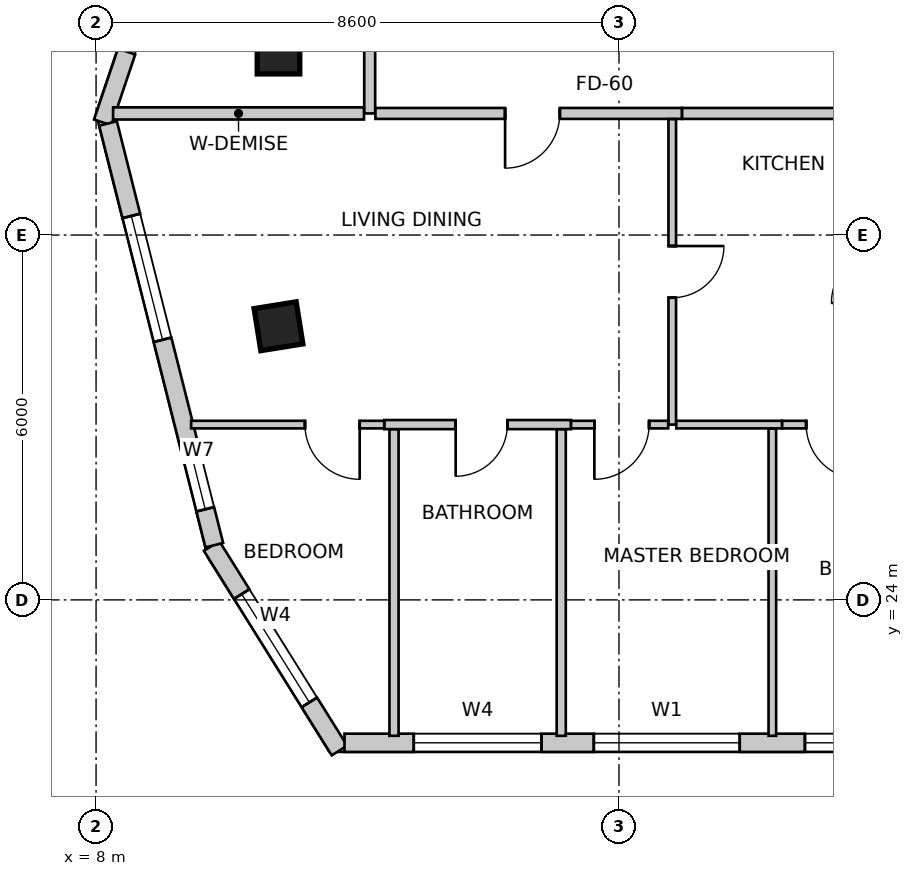
"""IFC4 building model, lengths in metres.
Left out: names, types, materials, properties, quantities, classifications, styles, units other than length and angle.
Written with IfcOpenShell. Run it as: python <this file> out.ifc"""

import sys

from ifc_helpers import new_model, si_unit, direction, frame, frame_2d, origin, origin_2d, place, context, subcontext, project, spatial, rectangle, extrude, source, transform, mapped, element, fill, save


model = new_model("IFC4")
c1 = context("Model", 3, precision=1e-05, world=origin(), true_north=direction((0.0, 1.0)))
c2 = subcontext(c1, "Body", "Model", "MODEL_VIEW")
j1 = project(units=[si_unit("LENGTHUNIT", "METRE"), si_unit("PLANEANGLEUNIT", "RADIAN")], contexts=[c1])
p1 = place(None, origin())
s1 = spatial("IfcSite", under=j1, at=p1, CompositionType="ELEMENT")
p2 = place(p1, origin())
s2 = spatial("IfcBuilding", under=s1, at=p2, CompositionType="ELEMENT")
p3 = place(p2, frame((0.0, 0.0, 288.9)))
s3 = spatial("IfcBuildingStorey", under=s2, at=p3, CompositionType="ELEMENT", Elevation=288.9)
m1 = source(origin(), c2, "Body", "SweptSolid", [
    extrude(rectangle(XDim=0.7, YDim=0.7, at=origin_2d()), origin(), (0.0, 0.0, 1.0), 3.6),
])
for number, where, z_axis, x_axis in (
    (1, (11.0, 33.0, 0.0), (0.0, 0.0, 1.0), (1.0, 0.0, 0.0)),
    (2, (11.0, 28.5, 0.0), (0.0, 0.0, 1.0), (0.158, -0.987, 0.0)),
):
    element("IfcColumn", number, at=place(p3, frame(where, z_axis=z_axis, x_axis=x_axis)), inside=s3, PredefinedType="COLUMN", context=c2, shape_type="MappedRepresentation", body=[
        mapped(m1, transform((0.0, 0.0, 0.0), scale=1.0)),
    ])
p4 = place(p3, frame((9.9, 24.887, 0.0), z_axis=(0.0, 0.0, 1.0), x_axis=(0.530004471907, -0.84799484654, 0.0)))
e3 = element("IfcWall", 3, at=p4, inside=s3, PredefinedType="SOLIDWALL", context=c2, shape_type="SweptSolid", body=[
    extrude(rectangle(XDim=3.967, YDim=0.3, at=frame_2d((1.983, 0.0))), origin(), (0.0, 0.0, 1.0), 3.35),
])
m2 = source(origin(), c2, "Body", "SweptSolid", [
    extrude(rectangle(XDim=2.1, YDim=2.0, at=frame_2d((1.05, 1.0))), frame((0.0, 0.16, 0.0), z_axis=(0.0, -1.0, 0.0), x_axis=(1.0, 0.0, 0.0)), (0.0, 0.0, 1.0), 0.32),
])
p5 = place(p4, frame((0.933, 0.0, 0.85)))
e4 = element("IfcOpeningElement", 4, at=p5, cuts=e3, PredefinedType="OPENING", context=c2, shape_type="MappedRepresentation", body=[
    mapped(m2, transform((0.0, 0.0, 0.0), scale=1.0)),
])
p6 = place(p3, frame((12.086, 21.65, 0.0), z_axis=(0.0, 0.0, 1.0), x_axis=(1.0, 0.0, 0.0)))
e5 = element("IfcWall", 5, at=p6, inside=s3, PredefinedType="SOLIDWALL", context=c2, shape_type="SweptSolid", body=[
    extrude(rectangle(XDim=10.642, YDim=0.3, at=frame_2d((5.321, 0.0))), origin(), (0.0, 0.0, 1.0), 3.35),
])
p7 = place(p6, frame((1.139, 0.0, 0.85)))
e6 = element("IfcOpeningElement", 6, at=p7, cuts=e5, PredefinedType="OPENING", context=c2, shape_type="MappedRepresentation", body=[
    mapped(m2, transform((0.0, 0.0, 0.0), scale=1.0)),
])
m3 = source(origin(), c2, "Body", "SweptSolid", [
    extrude(rectangle(XDim=2.4, YDim=2.2, at=frame_2d((1.2, 1.1))), frame((0.0, 0.16, 0.0), z_axis=(0.0, -1.0, 0.0), x_axis=(1.0, 0.0, 0.0)), (0.0, 0.0, 1.0), 0.32),
])
p8 = place(p6, frame((4.1, 0.0, 0.85)))
e7 = element("IfcOpeningElement", 7, at=p8, cuts=e5, PredefinedType="OPENING", context=c2, shape_type="MappedRepresentation", body=[
    mapped(m3, transform((0.0, 0.0, 0.0), scale=1.0)),
])
p9 = place(p6, frame((7.572, 0.0, 0.85)))
e8 = element("IfcOpeningElement", 8, at=p9, cuts=e5, PredefinedType="OPENING", context=c2, shape_type="MappedRepresentation", body=[
    mapped(m3, transform((0.0, 0.0, 0.0), scale=1.0)),
])
p10 = place(p3, frame((8.502, 33.017, 0.0), z_axis=(0.0, 0.0, 1.0), x_axis=(-0.319798692732, -0.947485512357, 0.0)))
e9 = element("IfcWall", 9, at=p10, inside=s3, PredefinedType="SOLIDWALL", context=c2, shape_type="SweptSolid", body=[
    extrude(rectangle(XDim=1.23, YDim=0.3, at=frame_2d((0.615, 0.0))), origin(), (0.0, 0.0, 1.0), 3.35),
])
p11 = place(p3, frame((8.196, 31.835, 0.0), z_axis=(0.0, 0.0, 1.0), x_axis=(0.244430846523, -0.969666726906, 0.0)))
e10 = element("IfcWall", 10, at=p11, inside=s3, PredefinedType="SOLIDWALL", context=c2, shape_type="SweptSolid", body=[
    extrude(rectangle(XDim=7.152, YDim=0.3, at=frame_2d((3.576, 0.0))), origin(), (0.0, 0.0, 1.0), 3.35),
])
p12 = place(p11, frame((1.568, 0.0, 0.85)))
e11 = element("IfcOpeningElement", 11, at=p12, cuts=e10, PredefinedType="OPENING", context=c2, shape_type="MappedRepresentation", body=[
    mapped(m2, transform((0.0, 0.0, 0.0), scale=1.0)),
])
m4 = source(origin(), c2, "Body", "SweptSolid", [
    extrude(rectangle(XDim=0.9, YDim=1.6, at=frame_2d((0.45, 0.8))), frame((0.0, 0.16, 0.0), z_axis=(0.0, -1.0, 0.0), x_axis=(1.0, 0.0, 0.0)), (0.0, 0.0, 1.0), 0.32),
])
p13 = place(p11, frame((5.643, 0.0, 0.85)))
e12 = element("IfcOpeningElement", 12, at=p13, cuts=e10, PredefinedType="OPENING", context=c2, shape_type="MappedRepresentation", body=[
    mapped(m4, transform((0.0, 0.0, 0.0), scale=1.0)),
])
p14 = place(p3, frame((12.5, 32.0, 0.0), z_axis=(0.0, 0.0, 1.0), x_axis=(0.0, 1.0, 0.0)))
e13 = element("IfcWall", 13, at=p14, inside=s3, PredefinedType="PARTITIONING", context=c2, shape_type="SweptSolid", body=[
    extrude(rectangle(XDim=1.556, YDim=0.18, at=frame_2d((0.778, 0.0))), origin(), (0.0, 0.0, 1.0), 3.034),
])
p15 = place(p3, frame((17.636, 32.0, 0.0), z_axis=(0.0, 0.0, 1.0), x_axis=(-1.0, 0.0, 0.0)))
e14 = element("IfcWall", 14, at=p15, inside=s3, PredefinedType="PARTITIONING", context=c2, shape_type="SweptSolid", body=[
    extrude(rectangle(XDim=5.042, YDim=0.18, at=frame_2d((2.521, 0.0))), origin(), (0.0, 0.0, 1.0), 3.034),
])
m5 = source(origin(), c2, "Body", "SweptSolid", [
    extrude(rectangle(XDim=0.9, YDim=2.15, at=frame_2d((0.45, 1.075))), frame((0.0, 0.1, 0.0), z_axis=(0.0, -1.0, 0.0), x_axis=(1.0, 0.0, 0.0)), (0.0, 0.0, 1.0), 0.2),
])
p16 = place(p15, frame((2.009, 0.0, 0.0)))
e15 = element("IfcOpeningElement", 15, at=p16, cuts=e14, PredefinedType="OPENING", context=c2, shape_type="MappedRepresentation", body=[
    mapped(m5, transform((0.0, 0.0, 0.0), scale=1.0)),
])
p17 = place(p3, frame((20.832, 32.0, 0.0), z_axis=(0.0, 0.0, 1.0), x_axis=(-1.0, 0.0, 0.0)))
e16 = element("IfcWall", 16, at=p17, inside=s3, PredefinedType="PARTITIONING", context=c2, shape_type="SweptSolid", body=[
    extrude(rectangle(XDim=3.194, YDim=0.18, at=frame_2d((1.597, 0.0))), origin(), (0.0, 0.0, 1.0), 3.35),
])
p18 = place(p3, frame((12.406, 32.0, 0.0), z_axis=(0.0, 0.0, 1.0), x_axis=(-1.0, 0.0, 0.0)))
e17 = element("IfcWall", 17, at=p18, inside=s3, PredefinedType="PARTITIONING", context=c2, shape_type="SweptSolid", body=[
    extrude(rectangle(XDim=4.126, YDim=0.2, at=frame_2d((2.063, 0.0))), origin(), (0.0, 0.0, 1.0), 2.642),
])
p19 = place(p3, frame((17.476, 31.906, 0.0), z_axis=(0.0, 0.0, 1.0), x_axis=(0.0, -1.0, 0.0)))
e18 = element("IfcWall", 18, at=p19, inside=s3, PredefinedType="PARTITIONING", context=c2, shape_type="SweptSolid", body=[
    extrude(rectangle(XDim=5.023, YDim=0.125, at=frame_2d((2.511, 0.0))), origin(), (0.0, 0.0, 1.0), 2.979),
])
m6 = source(origin(), c2, "Body", "SweptSolid", [
    extrude(rectangle(XDim=0.85, YDim=2.15, at=frame_2d((0.425, 1.075))), frame((0.0, 0.073, 0.0), z_axis=(0.0, -1.0, 0.0), x_axis=(1.0, 0.0, 0.0)), (0.0, 0.0, 1.0), 0.145),
])
p20 = place(p19, frame((2.086, 0.0, 0.0)))
e19 = element("IfcOpeningElement", 19, at=p20, cuts=e18, PredefinedType="OPENING", context=c2, shape_type="MappedRepresentation", body=[
    mapped(m6, transform((0.0, 0.0, 0.0), scale=1.0)),
])
p21 = place(p3, frame((15.81, 26.883, 0.0), z_axis=(0.0, 0.0, 1.0), x_axis=(-1.0, 0.0, 0.0)))
e20 = element("IfcWall", 20, at=p21, inside=s3, PredefinedType="PARTITIONING", context=c2, shape_type="SweptSolid", body=[
    extrude(rectangle(XDim=3.07, YDim=0.15, at=frame_2d((1.535, 0.0))), origin(), (0.0, 0.0, 1.0), 3.034),
])
m7 = source(origin(), c2, "Body", "SweptSolid", [
    extrude(rectangle(XDim=0.85, YDim=2.15, at=frame_2d((0.425, 1.075))), frame((0.0, 0.085, 0.0), z_axis=(0.0, -1.0, 0.0), x_axis=(1.0, 0.0, 0.0)), (0.0, 0.0, 1.0), 0.17),
])
p22 = place(p21, frame((1.046, 0.0, 0.0)))
e21 = element("IfcOpeningElement", 21, at=p22, cuts=e20, PredefinedType="OPENING", context=c2, shape_type="MappedRepresentation", body=[
    mapped(m7, transform((0.0, 0.0, 0.0), scale=1.0)),
])
p23 = place(p3, frame((12.738, 26.883, 0.0), z_axis=(0.0, 0.0, 1.0), x_axis=(-1.0, 0.0, 0.0)))
e22 = element("IfcWall", 22, at=p23, inside=s3, PredefinedType="PARTITIONING", context=c2, shape_type="SweptSolid", body=[
    extrude(rectangle(XDim=3.175, YDim=0.125, at=frame_2d((1.587, 0.0))), origin(), (0.0, 0.0, 1.0), 3.35),
])
m8 = source(origin(), c2, "Body", "SweptSolid", [
    extrude(rectangle(XDim=0.9, YDim=2.15, at=frame_2d((0.45, 1.075))), frame((0.0, 0.073, 0.0), z_axis=(0.0, -1.0, 0.0), x_axis=(1.0, 0.0, 0.0)), (0.0, 0.0, 1.0), 0.145),
])
p24 = place(p23, frame((0.403, 0.0, 0.0)))
e23 = element("IfcOpeningElement", 23, at=p24, cuts=e22, PredefinedType="OPENING", context=c2, shape_type="MappedRepresentation", body=[
    mapped(m8, transform((0.0, 0.0, 0.0), scale=1.0)),
])
p25 = place(p3, frame((17.409, 26.883, 0.0), z_axis=(0.0, 0.0, 1.0), x_axis=(-1.0, 0.0, 0.0)))
e24 = element("IfcWall", 24, at=p25, inside=s3, PredefinedType="PARTITIONING", context=c2, shape_type="SweptSolid", body=[
    extrude(rectangle(XDim=1.597, YDim=0.125, at=frame_2d((0.799, 0.0))), origin(), (0.0, 0.0, 1.0), 3.034),
])
p26 = place(p25, frame((0.314, 0.0, 0.0)))
e25 = element("IfcOpeningElement", 25, at=p26, cuts=e24, PredefinedType="OPENING", context=c2, shape_type="MappedRepresentation", body=[
    mapped(m8, transform((0.0, 0.0, 0.0), scale=1.0)),
])
p27 = place(p3, frame((19.282, 26.883, 0.0), z_axis=(0.0, 0.0, 1.0), x_axis=(-1.0, 0.0, 0.0)))
e26 = element("IfcWall", 26, at=p27, inside=s3, PredefinedType="PARTITIONING", context=c2, shape_type="SweptSolid", body=[
    extrude(rectangle(XDim=1.74, YDim=0.125, at=frame_2d((0.87, 0.0))), origin(), (0.0, 0.0, 1.0), 3.35),
])
p28 = place(p3, frame((20.927, 26.883, 0.0), z_axis=(0.0, 0.0, 1.0), x_axis=(-1.0, 0.0, 0.0)))
e27 = element("IfcWall", 27, at=p28, inside=s3, PredefinedType="PARTITIONING", context=c2, shape_type="SweptSolid", body=[
    extrude(rectangle(XDim=1.644, YDim=0.125, at=frame_2d((0.822, 0.0))), origin(), (0.0, 0.0, 1.0), 3.35),
])
p29 = place(p28, frame((0.349, 0.0, 0.0)))
e28 = element("IfcOpeningElement", 28, at=p29, cuts=e27, PredefinedType="OPENING", context=c2, shape_type="MappedRepresentation", body=[
    mapped(m8, transform((0.0, 0.0, 0.0), scale=1.0)),
])
p30 = place(p3, frame((12.9, 21.765, 0.0), z_axis=(0.0, 0.0, 1.0), x_axis=(0.0, 1.0, 0.0)))
e29 = element("IfcWall", 29, at=p30, inside=s3, PredefinedType="PARTITIONING", context=c2, shape_type="SweptSolid", body=[
    extrude(rectangle(XDim=5.039, YDim=0.15, at=frame_2d((2.52, 0.0))), origin(), (0.0, 0.0, 1.0), 3.35),
])
p31 = place(p3, frame((15.65, 26.804, 0.0), z_axis=(0.0, 0.0, 1.0), x_axis=(0.0, -1.0, 0.0)))
e30 = element("IfcWall", 30, at=p31, inside=s3, PredefinedType="PARTITIONING", context=c2, shape_type="SweptSolid", body=[
    extrude(rectangle(XDim=5.039, YDim=0.15, at=frame_2d((2.52, 0.0))), origin(), (0.0, 0.0, 1.0), 3.034),
])
p32 = place(p3, frame((19.122, 26.816, 0.0), z_axis=(0.0, 0.0, 1.0), x_axis=(0.0, -1.0, 0.0)))
e31 = element("IfcWall", 31, at=p32, inside=s3, PredefinedType="PARTITIONING", context=c2, shape_type="SweptSolid", body=[
    extrude(rectangle(XDim=5.052, YDim=0.125, at=frame_2d((2.526, 0.0))), origin(), (0.0, 0.0, 1.0), 3.034),
])
m9 = source(origin(), c2, "Body", "SweptSolid", [
    extrude(rectangle(XDim=2.1, YDim=2.0, at=frame_2d((1.05, 1.0))), frame((0.0, -0.015, 0.0), z_axis=(0.0, -1.0, 0.0), x_axis=(1.0, 0.0, 0.0)), (0.0, 0.0, 1.0), 0.06),
])
p33 = place(p5, origin())
e32 = element("IfcWindow", 32, at=p33, inside=s3, PartitioningType="SINGLE_PANEL", PredefinedType="WINDOW", context=c2, shape_type="MappedRepresentation", body=[
    mapped(m9, transform((0.0, 0.0, 0.0), scale=1.0)),
])
fill(e4, e32)
p34 = place(p7, origin())
e33 = element("IfcWindow", 33, at=p34, inside=s3, PartitioningType="SINGLE_PANEL", PredefinedType="WINDOW", context=c2, shape_type="MappedRepresentation", body=[
    mapped(m9, transform((0.0, 0.0, 0.0), scale=1.0)),
])
fill(e6, e33)
m10 = source(origin(), c2, "Body", "SweptSolid", [
    extrude(rectangle(XDim=2.4, YDim=2.2, at=frame_2d((1.2, 1.1))), frame((0.0, -0.015, 0.0), z_axis=(0.0, -1.0, 0.0), x_axis=(1.0, 0.0, 0.0)), (0.0, 0.0, 1.0), 0.06),
])
p35 = place(p8, origin())
e34 = element("IfcWindow", 34, at=p35, inside=s3, PartitioningType="SINGLE_PANEL", PredefinedType="WINDOW", context=c2, shape_type="MappedRepresentation", body=[
    mapped(m10, transform((0.0, 0.0, 0.0), scale=1.0)),
])
fill(e7, e34)
p36 = place(p9, origin())
e35 = element("IfcWindow", 35, at=p36, inside=s3, PartitioningType="SINGLE_PANEL", PredefinedType="WINDOW", context=c2, shape_type="MappedRepresentation", body=[
    mapped(m10, transform((0.0, 0.0, 0.0), scale=1.0)),
])
fill(e8, e35)
p37 = place(p12, origin())
e36 = element("IfcWindow", 36, at=p37, inside=s3, PartitioningType="SINGLE_PANEL", PredefinedType="WINDOW", context=c2, shape_type="MappedRepresentation", body=[
    mapped(m9, transform((0.0, 0.0, 0.0), scale=1.0)),
])
fill(e11, e36)
m11 = source(origin(), c2, "Body", "SweptSolid", [
    extrude(rectangle(XDim=0.9, YDim=1.6, at=frame_2d((0.45, 0.8))), frame((0.0, -0.015, 0.0), z_axis=(0.0, -1.0, 0.0), x_axis=(1.0, 0.0, 0.0)), (0.0, 0.0, 1.0), 0.06),
])
p38 = place(p13, origin())
e37 = element("IfcWindow", 37, at=p38, inside=s3, PartitioningType="SINGLE_PANEL", PredefinedType="WINDOW", context=c2, shape_type="MappedRepresentation", body=[
    mapped(m11, transform((0.0, 0.0, 0.0), scale=1.0)),
])
fill(e12, e37)
m12 = source(origin(), c2, "Body", "SweptSolid", [
    extrude(rectangle(XDim=0.9, YDim=2.15, at=frame_2d((0.45, 1.075))), frame((0.0, 0.025, 0.0), z_axis=(0.0, -1.0, 0.0), x_axis=(1.0, 0.0, 0.0)), (0.0, 0.0, 1.0), 0.05),
])
p39 = place(p16, origin())
e38 = element("IfcDoor", 38, at=p39, inside=s3, OperationType="SINGLE_SWING_RIGHT", PredefinedType="DOOR", context=c2, shape_type="MappedRepresentation", body=[
    mapped(m12, transform((0.0, 0.0, 0.0), scale=1.0)),
])
fill(e15, e38)
m13 = source(origin(), c2, "Body", "SweptSolid", [
    extrude(rectangle(XDim=0.85, YDim=2.15, at=frame_2d((0.425, 1.075))), frame((0.0, 0.025, 0.0), z_axis=(0.0, -1.0, 0.0), x_axis=(1.0, 0.0, 0.0)), (0.0, 0.0, 1.0), 0.05),
])
p40 = place(p20, origin())
e39 = element("IfcDoor", 39, at=p40, inside=s3, OperationType="SINGLE_SWING_LEFT", PredefinedType="DOOR", context=c2, shape_type="MappedRepresentation", body=[
    mapped(m13, transform((0.0, 0.0, 0.0), scale=1.0)),
])
fill(e19, e39)
p41 = place(p22, origin())
e40 = element("IfcDoor", 40, at=p41, inside=s3, OperationType="SINGLE_SWING_RIGHT", PredefinedType="DOOR", context=c2, shape_type="MappedRepresentation", body=[
    mapped(m13, transform((0.0, 0.0, 0.0), scale=1.0)),
])
fill(e21, e40)
m14 = source(origin(), c2, "Body", "SweptSolid", [
    extrude(rectangle(XDim=0.9, YDim=2.15, at=frame_2d((0.45, 1.075))), frame((0.0, 0.025, 0.0), z_axis=(0.0, -1.0, 0.0), x_axis=(1.0, 0.0, 0.0)), (0.0, 0.0, 1.0), 0.05),
])
p42 = place(p24, origin())
e41 = element("IfcDoor", 41, at=p42, inside=s3, OperationType="SINGLE_SWING_LEFT", PredefinedType="DOOR", context=c2, shape_type="MappedRepresentation", body=[
    mapped(m14, transform((0.0, 0.0, 0.0), scale=1.0)),
])
fill(e23, e41)
p43 = place(p26, origin())
e42 = element("IfcDoor", 42, at=p43, inside=s3, OperationType="SINGLE_SWING_RIGHT", PredefinedType="DOOR", context=c2, shape_type="MappedRepresentation", body=[
    mapped(m14, transform((0.0, 0.0, 0.0), scale=1.0)),
])
fill(e25, e42)
p44 = place(p29, origin())
e43 = element("IfcDoor", 43, at=p44, inside=s3, OperationType="SINGLE_SWING_LEFT", PredefinedType="DOOR", context=c2, shape_type="MappedRepresentation", body=[
    mapped(m14, transform((0.0, 0.0, 0.0), scale=1.0)),
])
fill(e28, e43)
save(model, sys.argv[1])
